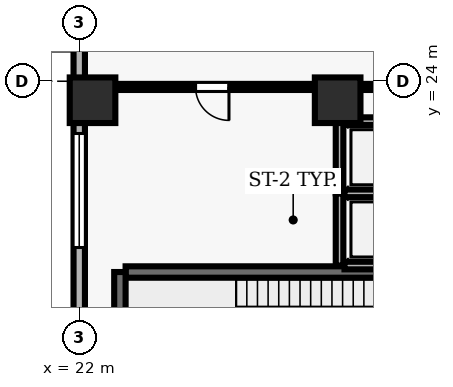
"""IFC4 building model, lengths in metres.
Left out: names, types, materials, properties, quantities, classifications, styles, units other than length and angle.
Written with IfcOpenShell. Run it as: python <this file> out.ifc"""

import sys

from ifc_helpers import new_model, si_unit, direction, frame, frame_2d, origin, origin_2d, place, context, subcontext, project, spatial, rectangle, extrude, element, fill, save


model = new_model("IFC4")
c1 = context("Model", 3, precision=1e-05, world=origin(), true_north=direction((0.0, 1.0)))
c2 = subcontext(c1, "Body", "Model", "MODEL_VIEW")
j1 = project(units=[si_unit("LENGTHUNIT", "METRE"), si_unit("PLANEANGLEUNIT", "RADIAN")], contexts=[c1])
p1 = place(None, origin())
s1 = spatial("IfcSite", under=j1, at=p1, CompositionType="ELEMENT")
p2 = place(p1, origin())
s2 = spatial("IfcBuilding", under=s1, at=p2, CompositionType="ELEMENT")
p3 = place(p2, frame((0.0, 0.0, 98.4)))
s3 = spatial("IfcBuildingStorey", under=s2, at=p3, CompositionType="ELEMENT", Elevation=98.4)
for number, where, z_axis, x_axis in (
    (1, (22.35, 23.5, 0.0), (0.0, 0.0, 1.0), (1.0, 0.0, 0.0)),
    (2, (28.8, 23.5, 0.0), (0.0, 0.0, 1.0), (1.0, 0.0, 0.0)),
):
    element("IfcColumn", number, at=place(p3, frame(where, z_axis=z_axis, x_axis=x_axis)), inside=s3, PredefinedType="COLUMN", context=c2, shape_type="SweptSolid", body=[
        extrude(rectangle(XDim=1.2, YDim=1.2, at=origin_2d()), origin(), (0.0, 0.0, 1.0), 5.0),
    ])
p4 = place(p3, frame((22.0, 46.1, 0.0), z_axis=(0.0, 0.0, 1.0), x_axis=(0.0, -1.0, 0.0)))
e3 = element("IfcWall", 3, at=p4, inside=s3, PredefinedType="SOLIDWALL", context=c2, shape_type="SweptSolid", body=[
    extrude(rectangle(XDim=43.6, YDim=0.3, at=frame_2d((21.8, 0.0))), origin(), (0.0, 0.0, 1.0), 4.79),
])
p5 = place(p4, frame((12.7, 0.0, 0.0)))
e4 = element("IfcOpeningElement", 4, at=p5, cuts=e3, PredefinedType="OPENING", context=c2, shape_type="SweptSolid", body=[
    extrude(rectangle(XDim=1.0, YDim=2.2, at=frame_2d((0.5, 1.1))), frame((0.0, 0.16, 0.0), z_axis=(0.0, -1.0, 0.0), x_axis=(1.0, 0.0, 0.0)), (0.0, 0.0, 1.0), 0.32),
])
p6 = place(p4, frame((1.225, 0.0, 0.9)))
e5 = element("IfcOpeningElement", 5, at=p6, cuts=e3, PredefinedType="OPENING", context=c2, shape_type="SweptSolid", body=[
    extrude(rectangle(XDim=3.0, YDim=2.2, at=frame_2d((1.5, 1.1))), frame((0.0, 0.16, 0.0), z_axis=(0.0, -1.0, 0.0), x_axis=(1.0, 0.0, 0.0)), (0.0, 0.0, 1.0), 0.32),
])
p7 = place(p4, frame((6.675, 0.0, 0.9)))
e6 = element("IfcOpeningElement", 6, at=p7, cuts=e3, PredefinedType="OPENING", context=c2, shape_type="SweptSolid", body=[
    extrude(rectangle(XDim=3.0, YDim=2.2, at=frame_2d((1.5, 1.1))), frame((0.0, 0.16, 0.0), z_axis=(0.0, -1.0, 0.0), x_axis=(1.0, 0.0, 0.0)), (0.0, 0.0, 1.0), 0.32),
])
p8 = place(p4, frame((23.475, 0.0, 0.9)))
e7 = element("IfcOpeningElement", 7, at=p8, cuts=e3, PredefinedType="OPENING", context=c2, shape_type="SweptSolid", body=[
    extrude(rectangle(XDim=3.0, YDim=2.2, at=frame_2d((1.5, 1.1))), frame((0.0, 0.16, 0.0), z_axis=(0.0, -1.0, 0.0), x_axis=(1.0, 0.0, 0.0)), (0.0, 0.0, 1.0), 0.32),
])
p9 = place(p4, frame((33.925, 0.0, 0.9)))
e8 = element("IfcOpeningElement", 8, at=p9, cuts=e3, PredefinedType="OPENING", context=c2, shape_type="SweptSolid", body=[
    extrude(rectangle(XDim=3.0, YDim=2.2, at=frame_2d((1.5, 1.1))), frame((0.0, 0.16, 0.0), z_axis=(0.0, -1.0, 0.0), x_axis=(1.0, 0.0, 0.0)), (0.0, 0.0, 1.0), 0.32),
])
p10 = place(p3, frame((31.58, 18.98, 0.0), z_axis=(0.0, 0.0, 1.0), x_axis=(-1.0, 0.0, 0.0)))
e9 = element("IfcWall", 9, at=p10, inside=s3, PredefinedType="SHEAR", context=c2, shape_type="SweptSolid", body=[
    extrude(rectangle(XDim=8.36, YDim=0.3, at=frame_2d((4.18, 0.0))), origin(), (0.0, 0.0, 1.0), 4.79),
])
p11 = place(p3, frame((23.07, 18.98, 0.0), z_axis=(0.0, 0.0, 1.0), x_axis=(0.0, -1.0, 0.0)))
e10 = element("IfcWall", 10, at=p11, inside=s3, PredefinedType="SHEAR", context=c2, shape_type="SweptSolid", body=[
    extrude(rectangle(XDim=3.51, YDim=0.3, at=frame_2d((1.755, 0.0))), origin(), (0.0, 0.0, 1.0), 4.79),
])
p12 = place(p3, frame((28.85, 21.05, 0.0), z_axis=(0.0, 0.0, 1.0), x_axis=(0.0, -1.0, 0.0)))
e11 = element("IfcWall", 11, at=p12, inside=s3, PredefinedType="SOLIDWALL", context=c2, shape_type="SweptSolid", body=[
    extrude(rectangle(XDim=1.9, YDim=0.2, at=frame_2d((0.95, 0.0))), origin(), (0.0, 0.0, 1.0), 4.79),
])
for number, where, z_axis, x_axis in (
    (12, (28.98, 19.15, 0.0), (0.0, 0.0, 1.0), (1.0, 0.0, 0.0)),
    (13, (31.42, 21.05, 0.0), (0.0, 0.0, 1.0), (-1.0, 0.0, 0.0)),
):
    element("IfcWall", number, at=place(p3, frame(where, z_axis=z_axis, x_axis=x_axis)), inside=s3, PredefinedType="SOLIDWALL", context=c2, shape_type="SweptSolid", body=[
        extrude(rectangle(XDim=2.44, YDim=0.2, at=frame_2d((1.22, 0.0))), origin(), (0.0, 0.0, 1.0), 4.79),
    ])
p13 = place(p3, frame((28.85, 22.95, 0.0), z_axis=(0.0, 0.0, 1.0), x_axis=(0.0, -1.0, 0.0)))
e14 = element("IfcWall", 14, at=p13, inside=s3, PredefinedType="SOLIDWALL", context=c2, shape_type="SweptSolid", body=[
    extrude(rectangle(XDim=1.9, YDim=0.2, at=frame_2d((0.95, 0.0))), origin(), (0.0, 0.0, 1.0), 4.79),
])
p14 = place(p3, frame((31.43, 22.95, 0.0), z_axis=(0.0, 0.0, 1.0), x_axis=(-1.0, 0.0, 0.0)))
e15 = element("IfcWall", 15, at=p14, inside=s3, PredefinedType="SOLIDWALL", context=c2, shape_type="SweptSolid", body=[
    extrude(rectangle(XDim=2.46, YDim=0.2, at=frame_2d((1.23, 0.0))), origin(), (0.0, 0.0, 1.0), 4.79),
])
p15 = place(p3, frame((28.8, 23.85, 0.0), z_axis=(0.0, 0.0, 1.0), x_axis=(-1.0, 0.0, 0.0)))
e16 = element("IfcWall", 16, at=p15, inside=s3, PredefinedType="PARTITIONING", context=c2, shape_type="SweptSolid", body=[
    extrude(rectangle(XDim=6.6, YDim=0.16, at=frame_2d((3.3, 0.0))), origin(), (0.0, 0.0, 1.0), 4.173),
])
p16 = place(p15, frame((2.86, 0.0, 0.0)))
e17 = element("IfcOpeningElement", 17, at=p16, cuts=e16, PredefinedType="OPENING", context=c2, shape_type="SweptSolid", body=[
    extrude(rectangle(XDim=0.88, YDim=2.1, at=frame_2d((0.44, 1.05))), frame((0.0, 0.09, 0.0), z_axis=(0.0, -1.0, 0.0), x_axis=(1.0, 0.0, 0.0)), (0.0, 0.0, 1.0), 0.18),
])
p17 = place(p3, frame((28.8, 23.85, 0.0), z_axis=(0.0, 0.0, 1.0), x_axis=(1.0, 0.0, 0.0)))
e18 = element("IfcWall", 18, at=p17, inside=s3, PredefinedType="PARTITIONING", context=c2, shape_type="SweptSolid", body=[
    extrude(rectangle(XDim=2.85, YDim=0.16, at=frame_2d((1.425, 0.0))), origin(), (0.0, 0.0, 1.0), 4.79),
])
p18 = place(p3, frame((28.8, 22.95, 0.0), z_axis=(0.0, 0.0, 1.0), x_axis=(0.0, 1.0, 0.0)))
e19 = element("IfcWall", 19, at=p18, inside=s3, PredefinedType="PARTITIONING", context=c2, shape_type="SweptSolid", body=[
    extrude(rectangle(XDim=0.825, YDim=0.135, at=frame_2d((0.413, 0.0))), origin(), (0.0, 0.0, 1.0), 4.79),
])
p19 = place(p8, origin())
e20 = element("IfcWindow", 20, at=p19, inside=s3, PartitioningType="SINGLE_PANEL", PredefinedType="WINDOW", context=c2, shape_type="SweptSolid", body=[
    extrude(rectangle(XDim=3.0, YDim=2.2, at=frame_2d((1.5, 1.1))), frame((0.0, 0.03, 0.0), z_axis=(0.0, -1.0, 0.0), x_axis=(1.0, 0.0, 0.0)), (0.0, 0.0, 1.0), 0.06),
])
fill(e7, e20)
p20 = place(p16, origin())
e21 = element("IfcDoor", 21, at=p20, inside=s3, OperationType="SINGLE_SWING_LEFT", PredefinedType="DOOR", context=c2, shape_type="SweptSolid", body=[
    extrude(rectangle(XDim=0.88, YDim=2.1, at=frame_2d((0.44, 1.05))), frame((0.0, 0.025, 0.0), z_axis=(0.0, -1.0, 0.0), x_axis=(1.0, 0.0, 0.0)), (0.0, 0.0, 1.0), 0.05),
])
fill(e17, e21)
save(model, sys.argv[1])
